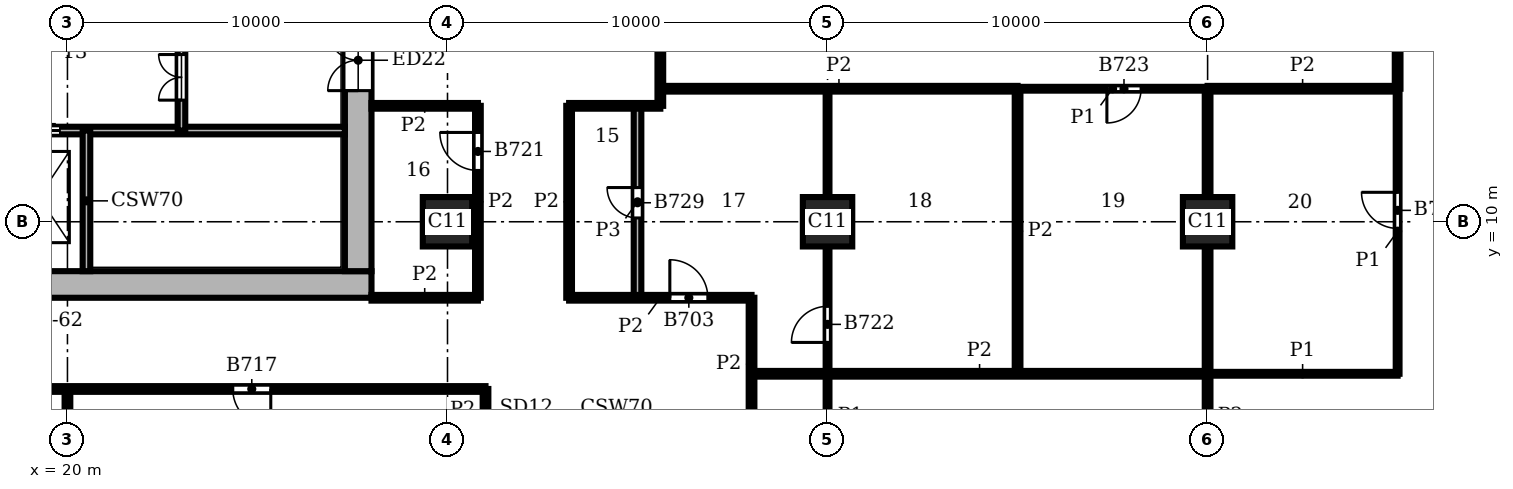
"""IFC4 building model, lengths in metres.
Left out: names, types, materials, properties, quantities, classifications, styles, units other than length and angle.
Written with IfcOpenShell. Run it as: python <this file> out.ifc"""

import sys

from ifc_helpers import new_model, si_unit, direction, frame, frame_2d, origin, origin_2d, place, context, subcontext, project, spatial, rectangle, extrude, element, fill, save


model = new_model("IFC4")
c1 = context("Model", 3, precision=1e-05, world=origin(), true_north=direction((0.0, 1.0)))
c2 = subcontext(c1, "Body", "Model", "MODEL_VIEW")
j1 = project(units=[si_unit("LENGTHUNIT", "METRE"), si_unit("PLANEANGLEUNIT", "RADIAN")], contexts=[c1])
p1 = place(None, origin())
s1 = spatial("IfcSite", under=j1, at=p1, CompositionType="ELEMENT")
p2 = place(p1, origin())
s2 = spatial("IfcBuilding", under=s1, at=p2, CompositionType="ELEMENT")
p3 = place(p2, frame((0.0, 0.0, 201.9)))
s3 = spatial("IfcBuildingStorey", under=s2, at=p3, CompositionType="ELEMENT", Elevation=201.9)
for number, where, z_axis, x_axis in (
    (1, (30.0, 10.0, 0.0), (0.0, 0.0, 1.0), (1.0, 0.0, 0.0)),
    (2, (40.0, 10.0, 0.0), (0.0, 0.0, 1.0), (1.0, 0.0, 0.0)),
    (3, (50.0, 10.0, 0.0), (0.0, 0.0, 1.0), (1.0, 0.0, 0.0)),
):
    element("IfcColumn", number, at=place(p3, frame(where, z_axis=z_axis, x_axis=x_axis)), inside=s3, PredefinedType="COLUMN", context=c2, shape_type="SweptSolid", body=[
        extrude(rectangle(XDim=1.3, YDim=1.3, at=origin_2d()), origin(), (0.0, 0.0, 1.0), 3.9),
    ])
p4 = place(p3, frame((8.0, 8.35, 0.0), z_axis=(0.0, 0.0, 1.0), x_axis=(1.0, 0.0, 0.0)))
e4 = element("IfcWall", 4, at=p4, inside=s3, PredefinedType="SHEAR", context=c2, shape_type="SweptSolid", body=[
    extrude(rectangle(XDim=20.0, YDim=0.7, at=frame_2d((10.0, 0.0))), origin(), (0.0, 0.0, 1.0), 3.9),
])
p5 = place(p3, frame((27.65, 8.7, 0.0), z_axis=(0.0, 0.0, 1.0), x_axis=(0.0, 1.0, 0.0)))
e5 = element("IfcWall", 5, at=p5, inside=s3, PredefinedType="SHEAR", context=c2, shape_type="SweptSolid", body=[
    extrude(rectangle(XDim=18.6, YDim=0.7, at=frame_2d((9.3, 0.0))), origin(), (0.0, 0.0, 1.0), 3.9),
])
p6 = place(p5, frame((4.75, 0.0, 0.0)))
e6 = element("IfcOpeningElement", 6, at=p6, cuts=e5, PredefinedType="OPENING", context=c2, shape_type="SweptSolid", body=[
    extrude(rectangle(XDim=1.6, YDim=2.1, at=frame_2d((0.8, 1.05))), frame((0.0, 0.36, 0.0), z_axis=(0.0, -1.0, 0.0), x_axis=(1.0, 0.0, 0.0)), (0.0, 0.0, 1.0), 0.72),
])
p7 = place(p3, frame((13.8, 12.4, 0.0), z_axis=(0.0, 0.0, 1.0), x_axis=(1.0, 0.0, 0.0)))
e7 = element("IfcWall", 7, at=p7, inside=s3, PredefinedType="SHEAR", context=c2, shape_type="SweptSolid", body=[
    extrude(rectangle(XDim=13.5, YDim=0.2, at=frame_2d((6.75, 0.0))), origin(), (0.0, 0.0, 1.0), 3.58),
])
p8 = place(p7, frame((2.4, 0.0, 0.0)))
e8 = element("IfcOpeningElement", 8, at=p8, cuts=e7, PredefinedType="OPENING", context=c2, shape_type="SweptSolid", body=[
    extrude(rectangle(XDim=1.1, YDim=2.1, at=frame_2d((0.55, 1.05))), frame((0.0, 0.11, 0.0), z_axis=(0.0, -1.0, 0.0), x_axis=(1.0, 0.0, 0.0)), (0.0, 0.0, 1.0), 0.22),
])
p9 = place(p7, frame((4.9, 0.0, 0.0)))
e9 = element("IfcOpeningElement", 9, at=p9, cuts=e7, PredefinedType="OPENING", context=c2, shape_type="SweptSolid", body=[
    extrude(rectangle(XDim=1.1, YDim=2.1, at=frame_2d((0.55, 1.05))), frame((0.0, 0.11, 0.0), z_axis=(0.0, -1.0, 0.0), x_axis=(1.0, 0.0, 0.0)), (0.0, 0.0, 1.0), 0.22),
])
p10 = place(p7, frame((0.2, 0.0, 0.0)))
e10 = element("IfcOpeningElement", 10, at=p10, cuts=e7, PredefinedType="OPENING", context=c2, shape_type="SweptSolid", body=[
    extrude(rectangle(XDim=1.0, YDim=2.1, at=frame_2d((0.5, 1.05))), frame((0.0, 0.11, 0.0), z_axis=(0.0, -1.0, 0.0), x_axis=(1.0, 0.0, 0.0)), (0.0, 0.0, 1.0), 0.22),
])
p11 = place(p3, frame((20.5, 8.7, 0.0), z_axis=(0.0, 0.0, 1.0), x_axis=(0.0, 1.0, 0.0)))
e11 = element("IfcWall", 11, at=p11, inside=s3, PredefinedType="SHEAR", context=c2, shape_type="SweptSolid", body=[
    extrude(rectangle(XDim=3.7, YDim=0.2, at=frame_2d((1.85, 0.0))), origin(), (0.0, 0.0, 1.0), 3.58),
])
p12 = place(p3, frame((23.0, 12.4, 0.0), z_axis=(0.0, 0.0, 1.0), x_axis=(0.0, 1.0, 0.0)))
e12 = element("IfcWall", 12, at=p12, inside=s3, PredefinedType="SHEAR", context=c2, shape_type="SweptSolid", body=[
    extrude(rectangle(XDim=2.8, YDim=0.2, at=frame_2d((1.4, 0.0))), origin(), (0.0, 0.0, 1.0), 3.58),
])
p13 = place(p12, frame((0.8, 0.0, 0.0)))
e13 = element("IfcOpeningElement", 13, at=p13, cuts=e12, PredefinedType="OPENING", context=c2, shape_type="SweptSolid", body=[
    extrude(rectangle(XDim=1.2, YDim=2.1, at=frame_2d((0.6, 1.05))), frame((0.0, 0.11, 0.0), z_axis=(0.0, -1.0, 0.0), x_axis=(1.0, 0.0, 0.0)), (0.0, 0.0, 1.0), 0.22),
])
p14 = place(p3, frame((40.0, 0.45, 0.0), z_axis=(0.0, 0.0, 1.0), x_axis=(0.0, 1.0, 0.0)))
e14 = element("IfcWall", 14, at=p14, inside=s3, PredefinedType="PARTITIONING", context=c2, shape_type="SweptSolid", body=[
    extrude(rectangle(XDim=8.9, YDim=0.1, at=frame_2d((4.45, 0.0))), origin(), (0.0, 0.0, 1.0), 3.58),
])
p15 = place(p14, frame((6.375, 0.0, 0.0)))
e15 = element("IfcOpeningElement", 15, at=p15, cuts=e14, PredefinedType="OPENING", context=c2, shape_type="SweptSolid", body=[
    extrude(rectangle(XDim=0.95, YDim=2.1, at=frame_2d((0.475, 1.05))), frame((0.0, 0.06, 0.0), z_axis=(0.0, -1.0, 0.0), x_axis=(1.0, 0.0, 0.0)), (0.0, 0.0, 1.0), 0.12),
])
p16 = place(p14, frame((3.0, 0.0, 0.0)))
e16 = element("IfcOpeningElement", 16, at=p16, cuts=e14, PredefinedType="OPENING", context=c2, shape_type="SweptSolid", body=[
    extrude(rectangle(XDim=0.9, YDim=2.1, at=frame_2d((0.45, 1.05))), frame((0.0, 0.06, 0.0), z_axis=(0.0, -1.0, 0.0), x_axis=(1.0, 0.0, 0.0)), (0.0, 0.0, 1.0), 0.12),
])
p17 = place(p3, frame((40.0, 10.65, 0.0), z_axis=(0.0, 0.0, 1.0), x_axis=(0.0, 1.0, 0.0)))
e17 = element("IfcWall", 17, at=p17, inside=s3, PredefinedType="PARTITIONING", context=c2, shape_type="SweptSolid", body=[
    extrude(rectangle(XDim=2.85, YDim=0.1, at=frame_2d((1.425, 0.0))), origin(), (0.0, 0.0, 1.0), 3.58),
])
p18 = place(p3, frame((55.0, 6.0, 0.0), z_axis=(0.0, 0.0, 1.0), x_axis=(0.0, 1.0, 0.0)))
e18 = element("IfcWall", 18, at=p18, inside=s3, PredefinedType="PARTITIONING", context=c2, shape_type="SweptSolid", body=[
    extrude(rectangle(XDim=7.5, YDim=0.1, at=frame_2d((3.75, 0.0))), origin(), (0.0, 0.0, 1.0), 3.58),
])
p19 = place(p18, frame((3.825, 0.0, 0.0)))
e19 = element("IfcOpeningElement", 19, at=p19, cuts=e18, PredefinedType="OPENING", context=c2, shape_type="SweptSolid", body=[
    extrude(rectangle(XDim=0.95, YDim=2.1, at=frame_2d((0.475, 1.05))), frame((0.0, 0.06, 0.0), z_axis=(0.0, -1.0, 0.0), x_axis=(1.0, 0.0, 0.0)), (0.0, 0.0, 1.0), 0.12),
])
p20 = place(p3, frame((50.0, 6.0, 0.0), z_axis=(0.0, 0.0, 1.0), x_axis=(1.0, 0.0, 0.0)))
e20 = element("IfcWall", 20, at=p20, inside=s3, PredefinedType="PARTITIONING", context=c2, shape_type="SweptSolid", body=[
    extrude(rectangle(XDim=5.0, YDim=0.1, at=frame_2d((2.5, 0.0))), origin(), (0.0, 0.0, 1.0), 3.58),
])
p21 = place(p3, frame((45.0, 13.5, 0.0), z_axis=(0.0, 0.0, 1.0), x_axis=(1.0, 0.0, 0.0)))
e21 = element("IfcWall", 21, at=p21, inside=s3, PredefinedType="PARTITIONING", context=c2, shape_type="SweptSolid", body=[
    extrude(rectangle(XDim=5.0, YDim=0.1, at=frame_2d((2.5, 0.0))), origin(), (0.0, 0.0, 1.0), 3.58),
])
p22 = place(p21, frame((2.35, 0.0, 0.0)))
e22 = element("IfcOpeningElement", 22, at=p22, cuts=e21, PredefinedType="OPENING", context=c2, shape_type="SweptSolid", body=[
    extrude(rectangle(XDim=0.9, YDim=2.1, at=frame_2d((0.45, 1.05))), frame((0.0, 0.06, 0.0), z_axis=(0.0, -1.0, 0.0), x_axis=(1.0, 0.0, 0.0)), (0.0, 0.0, 1.0), 0.12),
])
p23 = place(p3, frame((20.0, 0.5, 0.0), z_axis=(0.0, 0.0, 1.0), x_axis=(0.0, 1.0, 0.0)))
e23 = element("IfcWall", 23, at=p23, inside=s3, PredefinedType="PARTITIONING", context=c2, shape_type="SweptSolid", body=[
    extrude(rectangle(XDim=5.1, YDim=0.15, at=frame_2d((2.55, 0.0))), origin(), (0.0, 0.0, 1.0), 3.58),
])
p24 = place(p3, frame((30.8, 8.0, 0.0), z_axis=(0.0, 0.0, 1.0), x_axis=(0.0, 1.0, 0.0)))
e24 = element("IfcWall", 24, at=p24, inside=s3, PredefinedType="PARTITIONING", context=c2, shape_type="SweptSolid", body=[
    extrude(rectangle(XDim=5.05, YDim=0.15, at=frame_2d((2.525, 0.0))), origin(), (0.0, 0.0, 1.0), 3.58),
])
p25 = place(p24, frame((3.35, 0.0, 0.0)))
e25 = element("IfcOpeningElement", 25, at=p25, cuts=e24, PredefinedType="OPENING", context=c2, shape_type="SweptSolid", body=[
    extrude(rectangle(XDim=1.0, YDim=2.1, at=frame_2d((0.5, 1.05))), frame((0.0, 0.085, 0.0), z_axis=(0.0, -1.0, 0.0), x_axis=(1.0, 0.0, 0.0)), (0.0, 0.0, 1.0), 0.17),
])
p26 = place(p3, frame((31.0, 4.5, 0.0), z_axis=(0.0, 0.0, 1.0), x_axis=(0.0, 1.0, 0.0)))
e26 = element("IfcWall", 26, at=p26, inside=s3, PredefinedType="PARTITIONING", context=c2, shape_type="SweptSolid", body=[
    extrude(rectangle(XDim=1.1, YDim=0.15, at=frame_2d((0.55, 0.0))), origin(), (0.0, 0.0, 1.0), 3.58),
])
p27 = place(p3, frame((33.2, 8.0, 0.0), z_axis=(0.0, 0.0, 1.0), x_axis=(0.0, 1.0, 0.0)))
e27 = element("IfcWall", 27, at=p27, inside=s3, PredefinedType="PARTITIONING", context=c2, shape_type="SweptSolid", body=[
    extrude(rectangle(XDim=5.05, YDim=0.15, at=frame_2d((2.525, 0.0))), origin(), (0.0, 0.0, 1.0), 3.58),
])
p28 = place(p3, frame((35.6, 13.05, 0.0), z_axis=(0.0, 0.0, 1.0), x_axis=(0.0, 1.0, 0.0)))
e28 = element("IfcWall", 28, at=p28, inside=s3, PredefinedType="PARTITIONING", context=c2, shape_type="SweptSolid", body=[
    extrude(rectangle(XDim=2.4, YDim=0.15, at=frame_2d((1.2, 0.0))), origin(), (0.0, 0.0, 1.0), 3.58),
])
p29 = place(p3, frame((38.0, 4.5, 0.0), z_axis=(0.0, 0.0, 1.0), x_axis=(0.0, 1.0, 0.0)))
e29 = element("IfcWall", 29, at=p29, inside=s3, PredefinedType="PARTITIONING", context=c2, shape_type="SweptSolid", body=[
    extrude(rectangle(XDim=3.5, YDim=0.15, at=frame_2d((1.75, 0.0))), origin(), (0.0, 0.0, 1.0), 3.58),
])
p30 = place(p3, frame((45.0, 6.0, 0.0), z_axis=(0.0, 0.0, 1.0), x_axis=(0.0, 1.0, 0.0)))
e30 = element("IfcWall", 30, at=p30, inside=s3, PredefinedType="PARTITIONING", context=c2, shape_type="SweptSolid", body=[
    extrude(rectangle(XDim=7.5, YDim=0.15, at=frame_2d((3.75, 0.0))), origin(), (0.0, 0.0, 1.0), 3.58),
])
p31 = place(p3, frame((50.0, 0.45, 0.0), z_axis=(0.0, 0.0, 1.0), x_axis=(0.0, 1.0, 0.0)))
e31 = element("IfcWall", 31, at=p31, inside=s3, PredefinedType="PARTITIONING", context=c2, shape_type="SweptSolid", body=[
    extrude(rectangle(XDim=8.9, YDim=0.15, at=frame_2d((4.45, 0.0))), origin(), (0.0, 0.0, 1.0), 3.58),
])
p32 = place(p3, frame((50.0, 10.65, 0.0), z_axis=(0.0, 0.0, 1.0), x_axis=(0.0, 1.0, 0.0)))
e32 = element("IfcWall", 32, at=p32, inside=s3, PredefinedType="PARTITIONING", context=c2, shape_type="SweptSolid", body=[
    extrude(rectangle(XDim=2.85, YDim=0.15, at=frame_2d((1.425, 0.0))), origin(), (0.0, 0.0, 1.0), 3.58),
])
p33 = place(p3, frame((55.0, 13.5, 0.0), z_axis=(0.0, 0.0, 1.0), x_axis=(0.0, 1.0, 0.0)))
e33 = element("IfcWall", 33, at=p33, inside=s3, PredefinedType="PARTITIONING", context=c2, shape_type="SweptSolid", body=[
    extrude(rectangle(XDim=12.5, YDim=0.15, at=frame_2d((6.25, 0.0))), origin(), (0.0, 0.0, 1.0), 3.58),
])
p34 = place(p3, frame((5.6, 5.6, 0.0), z_axis=(0.0, 0.0, 1.0), x_axis=(1.0, 0.0, 0.0)))
e34 = element("IfcWall", 34, at=p34, inside=s3, PredefinedType="PARTITIONING", context=c2, shape_type="SweptSolid", body=[
    extrude(rectangle(XDim=25.4, YDim=0.15, at=frame_2d((12.7, 0.0))), origin(), (0.0, 0.0, 1.0), 3.58),
])
p35 = place(p34, frame((5.35, 0.0, 0.0)))
e35 = element("IfcOpeningElement", 35, at=p35, cuts=e34, PredefinedType="OPENING", context=c2, shape_type="SweptSolid", body=[
    extrude(rectangle(XDim=1.0, YDim=2.1, at=frame_2d((0.5, 1.05))), frame((0.0, 0.085, 0.0), z_axis=(0.0, -1.0, 0.0), x_axis=(1.0, 0.0, 0.0)), (0.0, 0.0, 1.0), 0.17),
])
p36 = place(p34, frame((11.25, 0.0, 0.0)))
e36 = element("IfcOpeningElement", 36, at=p36, cuts=e34, PredefinedType="OPENING", context=c2, shape_type="SweptSolid", body=[
    extrude(rectangle(XDim=1.0, YDim=2.1, at=frame_2d((0.5, 1.05))), frame((0.0, 0.085, 0.0), z_axis=(0.0, -1.0, 0.0), x_axis=(1.0, 0.0, 0.0)), (0.0, 0.0, 1.0), 0.17),
])
p37 = place(p34, frame((18.75, 0.0, 0.0)))
e37 = element("IfcOpeningElement", 37, at=p37, cuts=e34, PredefinedType="OPENING", context=c2, shape_type="SweptSolid", body=[
    extrude(rectangle(XDim=1.0, YDim=2.1, at=frame_2d((0.5, 1.05))), frame((0.0, 0.085, 0.0), z_axis=(0.0, -1.0, 0.0), x_axis=(1.0, 0.0, 0.0)), (0.0, 0.0, 1.0), 0.17),
])
p38 = place(p3, frame((38.0, 6.0, 0.0), z_axis=(0.0, 0.0, 1.0), x_axis=(1.0, 0.0, 0.0)))
e38 = element("IfcWall", 38, at=p38, inside=s3, PredefinedType="PARTITIONING", context=c2, shape_type="SweptSolid", body=[
    extrude(rectangle(XDim=12.0, YDim=0.15, at=frame_2d((6.0, 0.0))), origin(), (0.0, 0.0, 1.0), 3.58),
])
p39 = place(p3, frame((28.0, 8.0, 0.0), z_axis=(0.0, 0.0, 1.0), x_axis=(1.0, 0.0, 0.0)))
e39 = element("IfcWall", 39, at=p39, inside=s3, PredefinedType="PARTITIONING", context=c2, shape_type="SweptSolid", body=[
    extrude(rectangle(XDim=2.8, YDim=0.15, at=frame_2d((1.4, 0.0))), origin(), (0.0, 0.0, 1.0), 3.58),
])
p40 = place(p3, frame((33.2, 8.0, 0.0), z_axis=(0.0, 0.0, 1.0), x_axis=(1.0, 0.0, 0.0)))
e40 = element("IfcWall", 40, at=p40, inside=s3, PredefinedType="PARTITIONING", context=c2, shape_type="SweptSolid", body=[
    extrude(rectangle(XDim=4.8, YDim=0.15, at=frame_2d((2.4, 0.0))), origin(), (0.0, 0.0, 1.0), 3.58),
])
p41 = place(p40, frame((2.65, 0.0, 0.0)))
e41 = element("IfcOpeningElement", 41, at=p41, cuts=e40, PredefinedType="OPENING", context=c2, shape_type="SweptSolid", body=[
    extrude(rectangle(XDim=1.0, YDim=2.1, at=frame_2d((0.5, 1.05))), frame((0.0, 0.085, 0.0), z_axis=(0.0, -1.0, 0.0), x_axis=(1.0, 0.0, 0.0)), (0.0, 0.0, 1.0), 0.17),
])
p42 = place(p3, frame((28.0, 13.05, 0.0), z_axis=(0.0, 0.0, 1.0), x_axis=(1.0, 0.0, 0.0)))
e42 = element("IfcWall", 42, at=p42, inside=s3, PredefinedType="PARTITIONING", context=c2, shape_type="SweptSolid", body=[
    extrude(rectangle(XDim=2.8, YDim=0.15, at=frame_2d((1.4, 0.0))), origin(), (0.0, 0.0, 1.0), 3.58),
])
p43 = place(p3, frame((33.2, 13.05, 0.0), z_axis=(0.0, 0.0, 1.0), x_axis=(1.0, 0.0, 0.0)))
e43 = element("IfcWall", 43, at=p43, inside=s3, PredefinedType="PARTITIONING", context=c2, shape_type="SweptSolid", body=[
    extrude(rectangle(XDim=2.4, YDim=0.15, at=frame_2d((1.2, 0.0))), origin(), (0.0, 0.0, 1.0), 3.58),
])
p44 = place(p3, frame((35.6, 13.5, 0.0), z_axis=(0.0, 0.0, 1.0), x_axis=(1.0, 0.0, 0.0)))
e44 = element("IfcWall", 44, at=p44, inside=s3, PredefinedType="PARTITIONING", context=c2, shape_type="SweptSolid", body=[
    extrude(rectangle(XDim=9.4, YDim=0.15, at=frame_2d((4.7, 0.0))), origin(), (0.0, 0.0, 1.0), 3.58),
])
p45 = place(p3, frame((50.0, 13.5, 0.0), z_axis=(0.0, 0.0, 1.0), x_axis=(1.0, 0.0, 0.0)))
e45 = element("IfcWall", 45, at=p45, inside=s3, PredefinedType="PARTITIONING", context=c2, shape_type="SweptSolid", body=[
    extrude(rectangle(XDim=5.0, YDim=0.15, at=frame_2d((2.5, 0.0))), origin(), (0.0, 0.0, 1.0), 3.58),
])
p46 = place(p3, frame((35.0, 8.0, 0.0), z_axis=(0.0, 0.0, 1.0), x_axis=(0.0, 1.0, 0.0)))
e46 = element("IfcWall", 46, at=p46, inside=s3, PredefinedType="PARTITIONING", context=c2, shape_type="SweptSolid", body=[
    extrude(rectangle(XDim=5.05, YDim=0.2, at=frame_2d((2.525, 0.0))), origin(), (0.0, 0.0, 1.0), 3.58),
])
p47 = place(p46, frame((2.1, 0.0, 0.0)))
e47 = element("IfcOpeningElement", 47, at=p47, cuts=e46, PredefinedType="OPENING", context=c2, shape_type="SweptSolid", body=[
    extrude(rectangle(XDim=0.8, YDim=2.1, at=frame_2d((0.4, 1.05))), frame((0.0, 0.11, 0.0), z_axis=(0.0, -1.0, 0.0), x_axis=(1.0, 0.0, 0.0)), (0.0, 0.0, 1.0), 0.22),
])
p48 = place(p9, origin())
e48 = element("IfcDoor", 48, at=p48, inside=s3, OperationType="DOUBLE_DOOR_SLIDING", PredefinedType="DOOR", context=c2, shape_type="SweptSolid", body=[
    extrude(rectangle(XDim=1.1, YDim=2.1, at=frame_2d((0.55, 1.05))), frame((0.0, 0.025, 0.0), z_axis=(0.0, -1.0, 0.0), x_axis=(1.0, 0.0, 0.0)), (0.0, 0.0, 1.0), 0.05),
])
fill(e9, e48)
p49 = place(p13, origin())
e49 = element("IfcDoor", 49, at=p49, inside=s3, OperationType="DOUBLE_DOOR_SINGLE_SWING", PredefinedType="DOOR", context=c2, shape_type="SweptSolid", body=[
    extrude(rectangle(XDim=1.2, YDim=2.1, at=frame_2d((0.6, 1.05))), frame((0.0, 0.025, 0.0), z_axis=(0.0, -1.0, 0.0), x_axis=(1.0, 0.0, 0.0)), (0.0, 0.0, 1.0), 0.05),
])
fill(e13, e49)
p50 = place(p6, origin())
e50 = element("IfcDoor", 50, at=p50, inside=s3, OperationType="DOUBLE_DOOR_SINGLE_SWING", PredefinedType="DOOR", context=c2, shape_type="SweptSolid", body=[
    extrude(rectangle(XDim=1.6, YDim=2.1, at=frame_2d((0.8, 1.05))), frame((0.0, 0.025, 0.0), z_axis=(0.0, -1.0, 0.0), x_axis=(1.0, 0.0, 0.0)), (0.0, 0.0, 1.0), 0.05),
])
fill(e6, e50)
p51 = place(p41, origin())
e51 = element("IfcDoor", 51, at=p51, inside=s3, OperationType="SINGLE_SWING_LEFT", PredefinedType="DOOR", context=c2, shape_type="SweptSolid", body=[
    extrude(rectangle(XDim=1.0, YDim=2.1, at=frame_2d((0.5, 1.05))), frame((0.0, 0.025, 0.0), z_axis=(0.0, -1.0, 0.0), x_axis=(1.0, 0.0, 0.0)), (0.0, 0.0, 1.0), 0.05),
])
fill(e41, e51)
p52 = place(p37, frame((1.0, 0.0, 0.0), z_axis=(0.0, 0.0, 1.0), x_axis=(-1.0, 0.0, 0.0)))
e52 = element("IfcDoor", 52, at=p52, inside=s3, OperationType="SINGLE_SWING_LEFT", PredefinedType="DOOR", context=c2, shape_type="SweptSolid", body=[
    extrude(rectangle(XDim=1.0, YDim=2.1, at=frame_2d((0.5, 1.05))), frame((0.0, 0.025, 0.0), z_axis=(0.0, -1.0, 0.0), x_axis=(1.0, 0.0, 0.0)), (0.0, 0.0, 1.0), 0.05),
])
fill(e37, e52)
p53 = place(p25, origin())
e53 = element("IfcDoor", 53, at=p53, inside=s3, OperationType="SINGLE_SWING_RIGHT", PredefinedType="DOOR", context=c2, shape_type="SweptSolid", body=[
    extrude(rectangle(XDim=1.0, YDim=2.1, at=frame_2d((0.5, 1.05))), frame((0.0, 0.025, 0.0), z_axis=(0.0, -1.0, 0.0), x_axis=(1.0, 0.0, 0.0)), (0.0, 0.0, 1.0), 0.05),
])
fill(e25, e53)
p54 = place(p15, origin())
e54 = element("IfcDoor", 54, at=p54, inside=s3, OperationType="SINGLE_SWING_LEFT", PredefinedType="DOOR", context=c2, shape_type="SweptSolid", body=[
    extrude(rectangle(XDim=0.95, YDim=2.1, at=frame_2d((0.475, 1.05))), frame((0.0, 0.025, 0.0), z_axis=(0.0, -1.0, 0.0), x_axis=(1.0, 0.0, 0.0)), (0.0, 0.0, 1.0), 0.05),
])
fill(e15, e54)
p55 = place(p22, frame((0.9, 0.0, 0.0), z_axis=(0.0, 0.0, 1.0), x_axis=(-1.0, 0.0, 0.0)))
e55 = element("IfcDoor", 55, at=p55, inside=s3, OperationType="SINGLE_SWING_RIGHT", PredefinedType="DOOR", context=c2, shape_type="SweptSolid", body=[
    extrude(rectangle(XDim=0.9, YDim=2.1, at=frame_2d((0.45, 1.05))), frame((0.0, 0.025, 0.0), z_axis=(0.0, -1.0, 0.0), x_axis=(1.0, 0.0, 0.0)), (0.0, 0.0, 1.0), 0.05),
])
fill(e22, e55)
p56 = place(p19, origin())
e56 = element("IfcDoor", 56, at=p56, inside=s3, OperationType="SINGLE_SWING_RIGHT", PredefinedType="DOOR", context=c2, shape_type="SweptSolid", body=[
    extrude(rectangle(XDim=0.95, YDim=2.1, at=frame_2d((0.475, 1.05))), frame((0.0, 0.025, 0.0), z_axis=(0.0, -1.0, 0.0), x_axis=(1.0, 0.0, 0.0)), (0.0, 0.0, 1.0), 0.05),
])
fill(e19, e56)
p57 = place(p47, origin())
e57 = element("IfcDoor", 57, at=p57, inside=s3, OperationType="SINGLE_SWING_RIGHT", PredefinedType="DOOR", context=c2, shape_type="SweptSolid", body=[
    extrude(rectangle(XDim=0.8, YDim=2.1, at=frame_2d((0.4, 1.05))), frame((0.0, 0.025, 0.0), z_axis=(0.0, -1.0, 0.0), x_axis=(1.0, 0.0, 0.0)), (0.0, 0.0, 1.0), 0.05),
])
fill(e47, e57)
save(model, sys.argv[1])
